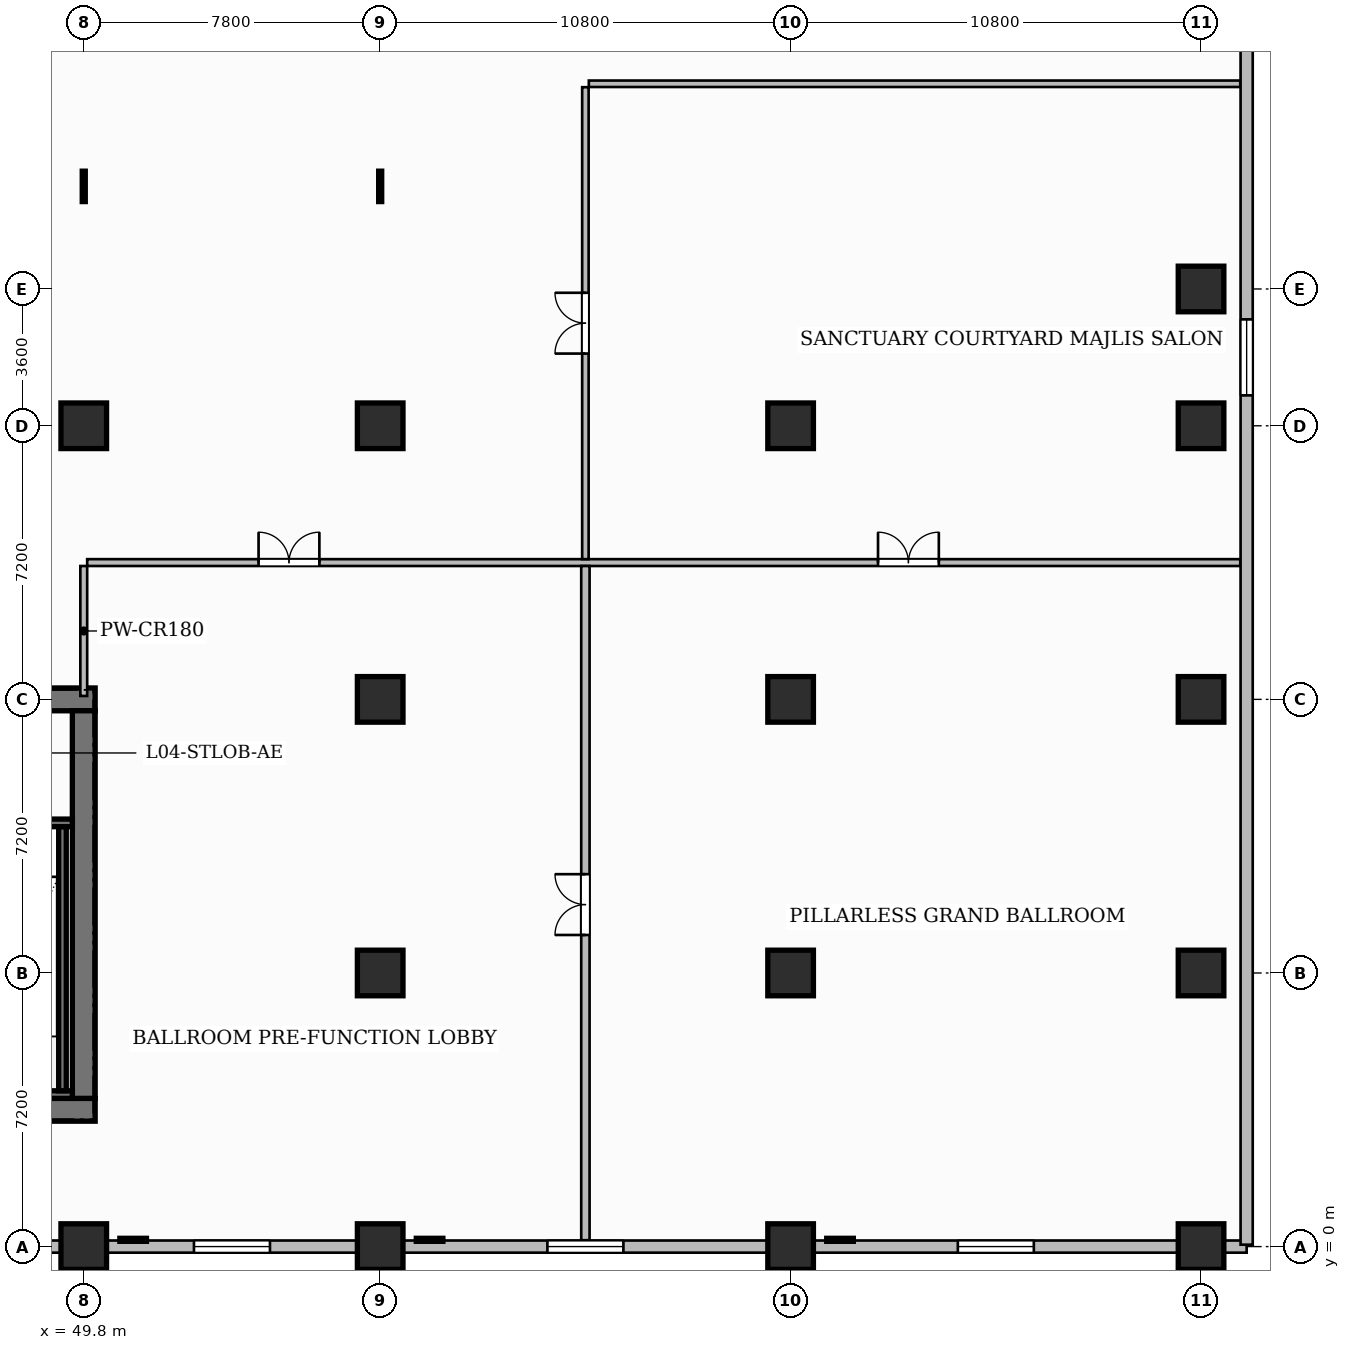
"""IFC4 building model, lengths in metres.
Left out: names, types, materials, properties, quantities, classifications, styles, units other than length and angle.
Written with IfcOpenShell. Run it as: python <this file> out.ifc"""

import sys

from ifc_helpers import new_model, si_unit, direction, frame, frame_2d, origin, origin_2d, place, context, subcontext, project, spatial, rectangle, extrude, source, transform, mapped, element, fill, save


model = new_model("IFC4")
c1 = context("Model", 3, precision=1e-05, world=origin(), true_north=direction((0.0, 1.0)))
c2 = subcontext(c1, "Body", "Model", "MODEL_VIEW")
j1 = project(units=[si_unit("LENGTHUNIT", "METRE"), si_unit("PLANEANGLEUNIT", "RADIAN")], contexts=[c1])
p1 = place(None, origin())
s1 = spatial("IfcSite", under=j1, at=p1, CompositionType="ELEMENT")
p2 = place(p1, origin())
s2 = spatial("IfcBuilding", under=s1, at=p2, CompositionType="ELEMENT")
p3 = place(p2, frame((0.0, 0.0, 21.6)))
s3 = spatial("IfcBuildingStorey", under=s2, at=p3, CompositionType="ELEMENT", Elevation=21.6)
p4 = place(p3, frame((34.5, 3.6, 0.0), z_axis=(0.0, 0.0, 1.0), x_axis=(1.0, 0.0, 0.0)))
e1 = element("IfcWall", 1, at=p4, inside=s3, PredefinedType="SHEAR", context=c2, shape_type="SweptSolid", body=[
    extrude(rectangle(XDim=15.6, YDim=0.6, at=frame_2d((7.8, 0.0))), origin(), (0.0, 0.0, 1.0), 5.4),
])
p5 = place(p4, frame((4.77, 0.0, 0.0)))
e2 = element("IfcOpeningElement", 2, at=p5, cuts=e1, PredefinedType="OPENING", context=c2, shape_type="SweptSolid", body=[
    extrude(rectangle(XDim=0.9, YDim=2.1, at=frame_2d((0.45, 1.05))), frame((0.0, 0.31, 0.0), z_axis=(0.0, -1.0, 0.0), x_axis=(1.0, 0.0, 0.0)), (0.0, 0.0, 1.0), 0.62),
])
p6 = place(p4, frame((7.15, 0.0, 0.0)))
e3 = element("IfcOpeningElement", 3, at=p6, cuts=e1, PredefinedType="OPENING", context=c2, shape_type="SweptSolid", body=[
    extrude(rectangle(XDim=0.9, YDim=2.1, at=frame_2d((0.45, 1.05))), frame((0.0, 0.31, 0.0), z_axis=(0.0, -1.0, 0.0), x_axis=(1.0, 0.0, 0.0)), (0.0, 0.0, 1.0), 0.62),
])
p7 = place(p3, frame((34.5, 14.4, 0.0), z_axis=(0.0, 0.0, 1.0), x_axis=(1.0, 0.0, 0.0)))
e4 = element("IfcWall", 4, at=p7, inside=s3, PredefinedType="SHEAR", context=c2, shape_type="SweptSolid", body=[
    extrude(rectangle(XDim=15.6, YDim=0.6, at=frame_2d((7.8, 0.0))), origin(), (0.0, 0.0, 1.0), 5.4),
])
p8 = place(p7, frame((5.43, 0.0, 0.0)))
e5 = element("IfcOpeningElement", 5, at=p8, cuts=e4, PredefinedType="OPENING", context=c2, shape_type="SweptSolid", body=[
    extrude(rectangle(XDim=1.5, YDim=2.2, at=frame_2d((0.75, 1.1))), frame((0.0, 0.31, 0.0), z_axis=(0.0, -1.0, 0.0), x_axis=(1.0, 0.0, 0.0)), (0.0, 0.0, 1.0), 0.62),
])
p9 = place(p7, frame((1.645, 0.0, 0.0)))
e6 = element("IfcOpeningElement", 6, at=p9, cuts=e4, PredefinedType="OPENING", context=c2, shape_type="SweptSolid", body=[
    extrude(rectangle(XDim=1.05, YDim=2.15, at=frame_2d((0.525, 1.075))), frame((0.0, 0.31, 0.0), z_axis=(0.0, -1.0, 0.0), x_axis=(1.0, 0.0, 0.0)), (0.0, 0.0, 1.0), 0.62),
])
p10 = place(p7, frame((11.275, 0.0, 0.0)))
e7 = element("IfcOpeningElement", 7, at=p10, cuts=e4, PredefinedType="OPENING", context=c2, shape_type="SweptSolid", body=[
    extrude(rectangle(XDim=1.05, YDim=2.15, at=frame_2d((0.525, 1.075))), frame((0.0, 0.31, 0.0), z_axis=(0.0, -1.0, 0.0), x_axis=(1.0, 0.0, 0.0)), (0.0, 0.0, 1.0), 0.62),
])
p11 = place(p3, frame((49.8, 3.9, 0.0), z_axis=(0.0, 0.0, 1.0), x_axis=(0.0, 1.0, 0.0)))
e8 = element("IfcWall", 8, at=p11, inside=s3, PredefinedType="SHEAR", context=c2, shape_type="SweptSolid", body=[
    extrude(rectangle(XDim=10.2, YDim=0.6, at=frame_2d((5.1, 0.0))), origin(), (0.0, 0.0, 1.0), 5.4),
])
m1 = source(origin(), c2, "Body", "SweptSolid", [
    extrude(rectangle(XDim=1.2, YDim=1.2, at=origin_2d()), origin(), (0.0, 0.0, 1.0), 5.4),
])
for number, where, z_axis, x_axis in (
    (9, (49.8, 0.0, 0.0), (0.0, 0.0, 1.0), (1.0, 0.0, 0.0)),
    (10, (49.8, 21.6, 0.0), (0.0, 0.0, 1.0), (1.0, 0.0, 0.0)),
    (11, (57.6, 0.0, 0.0), (0.0, 0.0, 1.0), (1.0, 0.0, 0.0)),
    (12, (57.6, 7.2, 0.0), (0.0, 0.0, 1.0), (1.0, 0.0, 0.0)),
    (13, (57.6, 14.4, 0.0), (0.0, 0.0, 1.0), (1.0, 0.0, 0.0)),
    (14, (57.6, 21.6, 0.0), (0.0, 0.0, 1.0), (1.0, 0.0, 0.0)),
    (15, (68.4, 0.0, 0.0), (0.0, 0.0, 1.0), (1.0, 0.0, 0.0)),
    (16, (68.4, 7.2, 0.0), (0.0, 0.0, 1.0), (1.0, 0.0, 0.0)),
    (17, (68.4, 14.4, 0.0), (0.0, 0.0, 1.0), (1.0, 0.0, 0.0)),
    (18, (68.4, 21.6, 0.0), (0.0, 0.0, 1.0), (1.0, 0.0, 0.0)),
    (19, (79.2, 0.0, 0.0), (0.0, 0.0, 1.0), (1.0, 0.0, 0.0)),
    (20, (79.2, 7.2, 0.0), (0.0, 0.0, 1.0), (1.0, 0.0, 0.0)),
    (21, (79.2, 14.4, 0.0), (0.0, 0.0, 1.0), (1.0, 0.0, 0.0)),
    (22, (79.2, 21.6, 0.0), (0.0, 0.0, 1.0), (1.0, 0.0, 0.0)),
    (23, (79.2, 25.2, 0.0), (0.0, 0.0, 1.0), (1.0, 0.0, 0.0)),
):
    element("IfcColumn", number, at=place(p3, frame(where, z_axis=z_axis, x_axis=x_axis)), inside=s3, PredefinedType="COLUMN", context=c2, shape_type="MappedRepresentation", body=[
        mapped(m1, transform((0.0, 0.0, 0.0), scale=1.0)),
    ])
p12 = place(p3, frame((43.12, 4.0, 0.0), z_axis=(0.0, 0.0, 1.0), x_axis=(1.0, 0.0, 0.0)))
e24 = element("IfcWall", 24, at=p12, inside=s3, PredefinedType="SHEAR", context=c2, shape_type="SweptSolid", body=[
    extrude(rectangle(XDim=6.38, YDim=0.2, at=frame_2d((3.19, 0.0))), origin(), (0.0, 0.0, 1.0), 5.4),
])
p13 = place(p3, frame((49.24, 4.1, 0.0), z_axis=(0.0, 0.0, 1.0), x_axis=(0.0, 1.0, 0.0)))
e25 = element("IfcWall", 25, at=p13, inside=s3, PredefinedType="SHEAR", context=c2, shape_type="SweptSolid", body=[
    extrude(rectangle(XDim=6.95, YDim=0.2, at=frame_2d((3.475, 0.0))), origin(), (0.0, 0.0, 1.0), 5.4),
])
p14 = place(p3, frame((43.12, 11.15, 0.0), z_axis=(0.0, 0.0, 1.0), x_axis=(1.0, 0.0, 0.0)))
e26 = element("IfcWall", 26, at=p14, inside=s3, PredefinedType="SHEAR", context=c2, shape_type="SweptSolid", body=[
    extrude(rectangle(XDim=6.38, YDim=0.2, at=frame_2d((3.19, 0.0))), origin(), (0.0, 0.0, 1.0), 5.4),
])
p15 = place(p14, frame((1.045, 0.0, 0.0)))
e27 = element("IfcOpeningElement", 27, at=p15, cuts=e26, PredefinedType="OPENING", context=c2, shape_type="SweptSolid", body=[
    extrude(rectangle(XDim=1.05, YDim=2.2, at=frame_2d((0.525, 1.1))), frame((0.0, 0.11, 0.0), z_axis=(0.0, -1.0, 0.0), x_axis=(1.0, 0.0, 0.0)), (0.0, 0.0, 1.0), 0.22),
])
p16 = place(p14, frame((4.125, 0.0, 0.0)))
e28 = element("IfcOpeningElement", 28, at=p16, cuts=e26, PredefinedType="OPENING", context=c2, shape_type="SweptSolid", body=[
    extrude(rectangle(XDim=1.05, YDim=2.2, at=frame_2d((0.525, 1.1))), frame((0.0, 0.11, 0.0), z_axis=(0.0, -1.0, 0.0), x_axis=(1.0, 0.0, 0.0)), (0.0, 0.0, 1.0), 0.22),
])
p17 = place(p3, frame((49.8, 14.49, 0.0), z_axis=(0.0, 0.0, 1.0), x_axis=(0.0, 1.0, 0.0)))
e29 = element("IfcWall", 29, at=p17, inside=s3, PredefinedType="PARTITIONING", context=c2, shape_type="SweptSolid", body=[
    extrude(rectangle(XDim=3.42, YDim=0.18, at=frame_2d((1.71, 0.0))), origin(), (0.0, 0.0, 1.0), 4.085),
])
p18 = place(p3, frame((49.89, 18.0, 0.0), z_axis=(0.0, 0.0, 1.0), x_axis=(1.0, 0.0, 0.0)))
e30 = element("IfcWall", 30, at=p18, inside=s3, PredefinedType="PARTITIONING", context=c2, shape_type="SweptSolid", body=[
    extrude(rectangle(XDim=30.342, YDim=0.18, at=frame_2d((15.171, 0.0))), origin(), (0.0, 0.0, 1.0), 5.1),
])
p19 = place(p18, frame((4.51, 0.0, 0.0)))
e31 = element("IfcOpeningElement", 31, at=p19, cuts=e30, PredefinedType="OPENING", context=c2, shape_type="SweptSolid", body=[
    extrude(rectangle(XDim=1.6, YDim=2.4, at=frame_2d((0.8, 1.2))), frame((0.0, 0.1, 0.0), z_axis=(0.0, -1.0, 0.0), x_axis=(1.0, 0.0, 0.0)), (0.0, 0.0, 1.0), 0.2),
])
p20 = place(p18, frame((20.81, 0.0, 0.0)))
e32 = element("IfcOpeningElement", 32, at=p20, cuts=e30, PredefinedType="OPENING", context=c2, shape_type="SweptSolid", body=[
    extrude(rectangle(XDim=1.6, YDim=2.4, at=frame_2d((0.8, 1.2))), frame((0.0, 0.1, 0.0), z_axis=(0.0, -1.0, 0.0), x_axis=(1.0, 0.0, 0.0)), (0.0, 0.0, 1.0), 0.2),
])
p21 = place(p3, frame((63.0, 0.168, 0.0), z_axis=(0.0, 0.0, 1.0), x_axis=(0.0, 1.0, 0.0)))
e33 = element("IfcWall", 33, at=p21, inside=s3, PredefinedType="PARTITIONING", context=c2, shape_type="SweptSolid", body=[
    extrude(rectangle(XDim=17.742, YDim=0.22, at=frame_2d((8.871, 0.0))), origin(), (0.0, 0.0, 1.0), 5.1),
])
p22 = place(p21, frame((8.032, 0.0, 0.0)))
e34 = element("IfcOpeningElement", 34, at=p22, cuts=e33, PredefinedType="OPENING", context=c2, shape_type="SweptSolid", body=[
    extrude(rectangle(XDim=1.6, YDim=2.4, at=frame_2d((0.8, 1.2))), frame((0.0, 0.12, 0.0), z_axis=(0.0, -1.0, 0.0), x_axis=(1.0, 0.0, 0.0)), (0.0, 0.0, 1.0), 0.24),
])
p23 = place(p3, frame((63.0, 18.09, 0.0), z_axis=(0.0, 0.0, 1.0), x_axis=(0.0, 1.0, 0.0)))
e35 = element("IfcWall", 35, at=p23, inside=s3, PredefinedType="PARTITIONING", context=c2, shape_type="SweptSolid", body=[
    extrude(rectangle(XDim=12.42, YDim=0.17, at=frame_2d((6.21, 0.0))), origin(), (0.0, 0.0, 1.0), 5.1),
])
p24 = place(p23, frame((5.41, 0.0, 0.0)))
e36 = element("IfcOpeningElement", 36, at=p24, cuts=e35, PredefinedType="OPENING", context=c2, shape_type="SweptSolid", body=[
    extrude(rectangle(XDim=1.6, YDim=2.4, at=frame_2d((0.8, 1.2))), frame((0.0, 0.095, 0.0), z_axis=(0.0, -1.0, 0.0), x_axis=(1.0, 0.0, 0.0)), (0.0, 0.0, 1.0), 0.19),
])
p25 = place(p3, frame((63.09, 30.6, 0.0), z_axis=(0.0, 0.0, 1.0), x_axis=(1.0, 0.0, 0.0)))
e37 = element("IfcWall", 37, at=p25, inside=s3, PredefinedType="PARTITIONING", context=c2, shape_type="SweptSolid", body=[
    extrude(rectangle(XDim=17.142, YDim=0.17, at=frame_2d((8.571, 0.0))), origin(), (0.0, 0.0, 1.0), 5.1),
])
p26 = place(p3, frame((-4.8, 0.0, 0.0), z_axis=(0.0, 0.0, 1.0), x_axis=(1.0, 0.0, 0.0)))
e38 = element("IfcWall", 38, at=p26, inside=s3, PredefinedType="SOLIDWALL", context=c2, shape_type="SweptSolid", body=[
    extrude(rectangle(XDim=85.2, YDim=0.32, at=frame_2d((42.6, 0.0))), origin(), (0.0, 0.0, 1.0), 4.085),
])
p27 = place(p26, frame((1.4, 0.0, 0.75)))
e39 = element("IfcOpeningElement", 39, at=p27, cuts=e38, PredefinedType="OPENING", context=c2, shape_type="SweptSolid", body=[
    extrude(rectangle(XDim=2.0, YDim=2.6, at=frame_2d((1.0, 1.3))), frame((0.0, 0.17, 0.0), z_axis=(0.0, -1.0, 0.0), x_axis=(1.0, 0.0, 0.0)), (0.0, 0.0, 1.0), 0.34),
])
p28 = place(p26, frame((7.4, 0.0, 0.75)))
e40 = element("IfcOpeningElement", 40, at=p28, cuts=e38, PredefinedType="OPENING", context=c2, shape_type="SweptSolid", body=[
    extrude(rectangle(XDim=2.0, YDim=2.6, at=frame_2d((1.0, 1.3))), frame((0.0, 0.17, 0.0), z_axis=(0.0, -1.0, 0.0), x_axis=(1.0, 0.0, 0.0)), (0.0, 0.0, 1.0), 0.34),
])
p29 = place(p26, frame((14.6, 0.0, 0.75)))
e41 = element("IfcOpeningElement", 41, at=p29, cuts=e38, PredefinedType="OPENING", context=c2, shape_type="SweptSolid", body=[
    extrude(rectangle(XDim=2.0, YDim=2.6, at=frame_2d((1.0, 1.3))), frame((0.0, 0.17, 0.0), z_axis=(0.0, -1.0, 0.0), x_axis=(1.0, 0.0, 0.0)), (0.0, 0.0, 1.0), 0.34),
])
p30 = place(p26, frame((21.8, 0.0, 0.75)))
e42 = element("IfcOpeningElement", 42, at=p30, cuts=e38, PredefinedType="OPENING", context=c2, shape_type="SweptSolid", body=[
    extrude(rectangle(XDim=2.0, YDim=2.6, at=frame_2d((1.0, 1.3))), frame((0.0, 0.17, 0.0), z_axis=(0.0, -1.0, 0.0), x_axis=(1.0, 0.0, 0.0)), (0.0, 0.0, 1.0), 0.34),
])
p31 = place(p26, frame((29.0, 0.0, 0.75)))
e43 = element("IfcOpeningElement", 43, at=p31, cuts=e38, PredefinedType="OPENING", context=c2, shape_type="SweptSolid", body=[
    extrude(rectangle(XDim=2.0, YDim=2.6, at=frame_2d((1.0, 1.3))), frame((0.0, 0.17, 0.0), z_axis=(0.0, -1.0, 0.0), x_axis=(1.0, 0.0, 0.0)), (0.0, 0.0, 1.0), 0.34),
])
p32 = place(p26, frame((35.6, 0.0, 0.75)))
e44 = element("IfcOpeningElement", 44, at=p32, cuts=e38, PredefinedType="OPENING", context=c2, shape_type="SweptSolid", body=[
    extrude(rectangle(XDim=2.0, YDim=2.6, at=frame_2d((1.0, 1.3))), frame((0.0, 0.17, 0.0), z_axis=(0.0, -1.0, 0.0), x_axis=(1.0, 0.0, 0.0)), (0.0, 0.0, 1.0), 0.34),
])
p33 = place(p26, frame((42.2, 0.0, 0.75)))
e45 = element("IfcOpeningElement", 45, at=p33, cuts=e38, PredefinedType="OPENING", context=c2, shape_type="SweptSolid", body=[
    extrude(rectangle(XDim=2.0, YDim=2.6, at=frame_2d((1.0, 1.3))), frame((0.0, 0.17, 0.0), z_axis=(0.0, -1.0, 0.0), x_axis=(1.0, 0.0, 0.0)), (0.0, 0.0, 1.0), 0.34),
])
p34 = place(p26, frame((49.7, 0.0, 0.75)))
e46 = element("IfcOpeningElement", 46, at=p34, cuts=e38, PredefinedType="OPENING", context=c2, shape_type="SweptSolid", body=[
    extrude(rectangle(XDim=2.0, YDim=2.6, at=frame_2d((1.0, 1.3))), frame((0.0, 0.17, 0.0), z_axis=(0.0, -1.0, 0.0), x_axis=(1.0, 0.0, 0.0)), (0.0, 0.0, 1.0), 0.34),
])
p35 = place(p26, frame((57.5, 0.0, 0.75)))
e47 = element("IfcOpeningElement", 47, at=p35, cuts=e38, PredefinedType="OPENING", context=c2, shape_type="SweptSolid", body=[
    extrude(rectangle(XDim=2.0, YDim=2.6, at=frame_2d((1.0, 1.3))), frame((0.0, 0.17, 0.0), z_axis=(0.0, -1.0, 0.0), x_axis=(1.0, 0.0, 0.0)), (0.0, 0.0, 1.0), 0.34),
])
p36 = place(p26, frame((66.8, 0.0, 0.75)))
e48 = element("IfcOpeningElement", 48, at=p36, cuts=e38, PredefinedType="OPENING", context=c2, shape_type="SweptSolid", body=[
    extrude(rectangle(XDim=2.0, YDim=2.6, at=frame_2d((1.0, 1.3))), frame((0.0, 0.17, 0.0), z_axis=(0.0, -1.0, 0.0), x_axis=(1.0, 0.0, 0.0)), (0.0, 0.0, 1.0), 0.34),
])
p37 = place(p26, frame((77.6, 0.0, 0.75)))
e49 = element("IfcOpeningElement", 49, at=p37, cuts=e38, PredefinedType="OPENING", context=c2, shape_type="SweptSolid", body=[
    extrude(rectangle(XDim=2.0, YDim=2.6, at=frame_2d((1.0, 1.3))), frame((0.0, 0.17, 0.0), z_axis=(0.0, -1.0, 0.0), x_axis=(1.0, 0.0, 0.0)), (0.0, 0.0, 1.0), 0.34),
])
p38 = place(p3, frame((80.4, 0.05, 0.0), z_axis=(0.0, 0.0, 1.0), x_axis=(0.0, 1.0, 0.0)))
e50 = element("IfcWall", 50, at=p38, inside=s3, PredefinedType="SOLIDWALL", context=c2, shape_type="SweptSolid", body=[
    extrude(rectangle(XDim=46.7, YDim=0.32, at=frame_2d((23.35, 0.0))), origin(), (0.0, 0.0, 1.0), 5.1),
])
p39 = place(p38, frame((22.35, 0.0, 0.75)))
e51 = element("IfcOpeningElement", 51, at=p39, cuts=e50, PredefinedType="OPENING", context=c2, shape_type="SweptSolid", body=[
    extrude(rectangle(XDim=2.0, YDim=2.6, at=frame_2d((1.0, 1.3))), frame((0.0, 0.17, 0.0), z_axis=(0.0, -1.0, 0.0), x_axis=(1.0, 0.0, 0.0)), (0.0, 0.0, 1.0), 0.34),
])
m2 = source(origin(), c2, "Body", "SweptSolid", [
    extrude(rectangle(XDim=1.6, YDim=2.4, at=frame_2d((0.8, 1.2))), frame((0.0, 0.025, 0.0), z_axis=(0.0, -1.0, 0.0), x_axis=(1.0, 0.0, 0.0)), (0.0, 0.0, 1.0), 0.05),
])
p40 = place(p22, origin())
e52 = element("IfcDoor", 52, at=p40, inside=s3, OperationType="DOUBLE_DOOR_SINGLE_SWING", PredefinedType="DOOR", context=c2, shape_type="MappedRepresentation", body=[
    mapped(m2, transform((0.0, 0.0, 0.0), scale=1.0)),
])
fill(e34, e52)
p41 = place(p19, origin())
e53 = element("IfcDoor", 53, at=p41, inside=s3, OperationType="DOUBLE_DOOR_SINGLE_SWING", PredefinedType="DOOR", context=c2, shape_type="MappedRepresentation", body=[
    mapped(m2, transform((0.0, 0.0, 0.0), scale=1.0)),
])
fill(e31, e53)
p42 = place(p20, origin())
e54 = element("IfcDoor", 54, at=p42, inside=s3, OperationType="DOUBLE_DOOR_SINGLE_SWING", PredefinedType="DOOR", context=c2, shape_type="MappedRepresentation", body=[
    mapped(m2, transform((0.0, 0.0, 0.0), scale=1.0)),
])
fill(e32, e54)
p43 = place(p24, origin())
e55 = element("IfcDoor", 55, at=p43, inside=s3, OperationType="DOUBLE_DOOR_SINGLE_SWING", PredefinedType="DOOR", context=c2, shape_type="MappedRepresentation", body=[
    mapped(m2, transform((0.0, 0.0, 0.0), scale=1.0)),
])
fill(e36, e55)
m3 = source(origin(), c2, "Body", "SweptSolid", [
    extrude(rectangle(XDim=2.0, YDim=2.6, at=frame_2d((1.0, 1.3))), frame((0.0, 0.03, 0.0), z_axis=(0.0, -1.0, 0.0), x_axis=(1.0, 0.0, 0.0)), (0.0, 0.0, 1.0), 0.06),
])
p44 = place(p35, origin())
e56 = element("IfcWindow", 56, at=p44, inside=s3, PartitioningType="DOUBLE_PANEL_VERTICAL", PredefinedType="WINDOW", context=c2, shape_type="MappedRepresentation", body=[
    mapped(m3, transform((0.0, 0.0, 0.0), scale=1.0)),
])
fill(e47, e56)
p45 = place(p36, origin())
e57 = element("IfcWindow", 57, at=p45, inside=s3, PartitioningType="DOUBLE_PANEL_VERTICAL", PredefinedType="WINDOW", context=c2, shape_type="MappedRepresentation", body=[
    mapped(m3, transform((0.0, 0.0, 0.0), scale=1.0)),
])
fill(e48, e57)
p46 = place(p37, origin())
e58 = element("IfcWindow", 58, at=p46, inside=s3, PartitioningType="DOUBLE_PANEL_VERTICAL", PredefinedType="WINDOW", context=c2, shape_type="MappedRepresentation", body=[
    mapped(m3, transform((0.0, 0.0, 0.0), scale=1.0)),
])
fill(e49, e58)
p47 = place(p39, origin())
e59 = element("IfcWindow", 59, at=p47, inside=s3, PartitioningType="DOUBLE_PANEL_VERTICAL", PredefinedType="WINDOW", context=c2, shape_type="MappedRepresentation", body=[
    mapped(m3, transform((0.0, 0.0, 0.0), scale=1.0)),
])
fill(e51, e59)
save(model, sys.argv[1])
